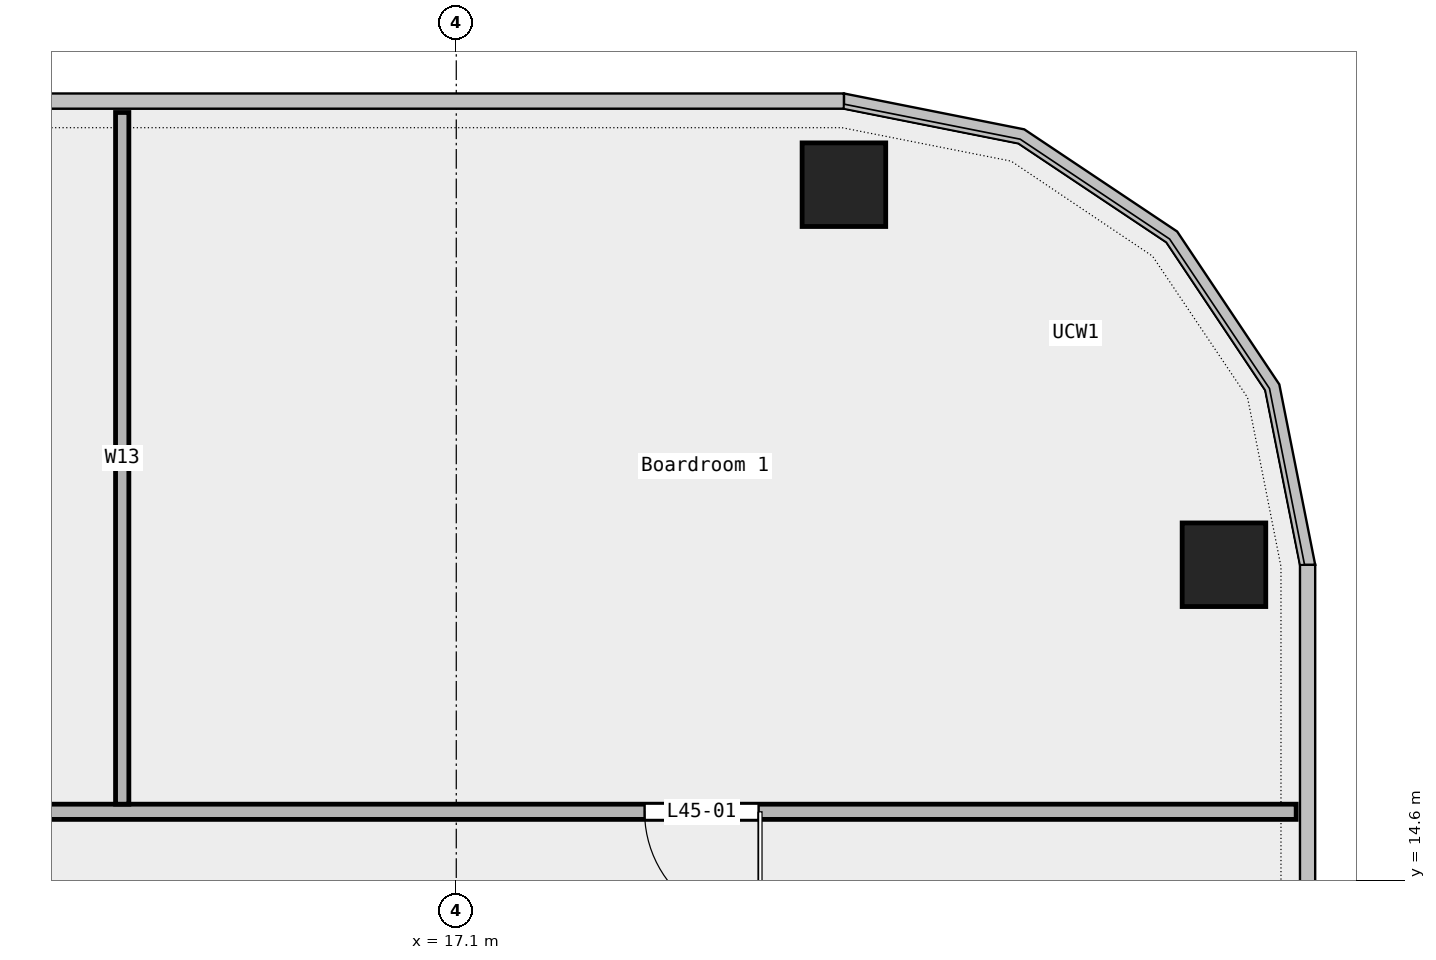
"""IFC4 building model, lengths in metres.
Left out: names, types, materials, properties, quantities, classifications, styles, units other than length and angle.
Written with IfcOpenShell. Run it as: python <this file> out.ifc"""

import sys

from ifc_helpers import new_model, si_unit, direction, frame, frame_2d, origin, origin_2d, place, context, subcontext, project, spatial, rectangle, extrude, element, fill, save


model = new_model("IFC4")
c1 = context("Model", 3, precision=1e-05, world=origin(), true_north=direction((0.0, 1.0)))
c2 = subcontext(c1, "Body", "Model", "MODEL_VIEW")
j1 = project(units=[si_unit("LENGTHUNIT", "METRE"), si_unit("PLANEANGLEUNIT", "RADIAN")], contexts=[c1])
p1 = place(None, origin())
s1 = spatial("IfcSite", under=j1, at=p1, CompositionType="ELEMENT")
p2 = place(p1, origin())
s2 = spatial("IfcBuilding", under=s1, at=p2, CompositionType="ELEMENT")
p3 = place(p2, frame((0.0, 0.0, 215.0)))
s3 = spatial("IfcBuildingStorey", under=s2, at=p3, CompositionType="ELEMENT", Elevation=215.0)
for number, where, z_axis, x_axis in (
    (1, (27.2, 18.75, 0.0), (0.0, 0.0, 1.0), (1.0, 0.0, 0.0)),
    (2, (22.2, 23.75, 0.0), (0.0, 0.0, 1.0), (1.0, 0.0, 0.0)),
):
    element("IfcColumn", number, at=place(p3, frame(where, z_axis=z_axis, x_axis=x_axis)), inside=s3, PredefinedType="COLUMN", context=c2, shape_type="SweptSolid", body=[
        extrude(rectangle(XDim=1.1, YDim=1.1, at=origin_2d()), origin(), (0.0, 0.0, 1.0), 3.6),
    ])
p4 = place(p3, frame((-17.76, 15.5, 0.0), z_axis=(0.0, 0.0, 1.0), x_axis=(1.0, 0.0, 0.0)))
e3 = element("IfcWall", 3, at=p4, inside=s3, PredefinedType="PARTITIONING", context=c2, shape_type="SweptSolid", body=[
    extrude(rectangle(XDim=45.91, YDim=0.2, at=frame_2d((22.955, 0.0))), origin(), (0.0, 0.0, 1.0), 3.6),
])
p5 = place(p4, frame((37.337, 0.0, 0.0)))
e4 = element("IfcOpeningElement", 4, at=p5, cuts=e3, PredefinedType="OPENING", context=c2, shape_type="SweptSolid", body=[
    extrude(rectangle(XDim=1.5, YDim=2.1, at=frame_2d((0.75, 1.05))), frame((0.0, 0.112, 0.0), z_axis=(0.0, -1.0, 0.0), x_axis=(1.0, 0.0, 0.0)), (0.0, 0.0, 1.0), 0.224),
])
p6 = place(p4, frame((24.633, 0.0, 0.0)))
e5 = element("IfcOpeningElement", 5, at=p6, cuts=e3, PredefinedType="OPENING", context=c2, shape_type="SweptSolid", body=[
    extrude(rectangle(XDim=1.5, YDim=2.1, at=frame_2d((0.75, 1.05))), frame((0.0, 0.112, 0.0), z_axis=(0.0, -1.0, 0.0), x_axis=(1.0, 0.0, 0.0)), (0.0, 0.0, 1.0), 0.224),
])
p7 = place(p4, frame((5.91, 0.0, 0.0)))
e6 = element("IfcOpeningElement", 6, at=p7, cuts=e3, PredefinedType="OPENING", context=c2, shape_type="SweptSolid", body=[
    extrude(rectangle(XDim=1.5, YDim=2.1, at=frame_2d((0.75, 1.05))), frame((0.0, 0.112, 0.0), z_axis=(0.0, -1.0, 0.0), x_axis=(1.0, 0.0, 0.0)), (0.0, 0.0, 1.0), 0.224),
])
p8 = place(p4, frame((16.21, 0.0, 0.0)))
e7 = element("IfcOpeningElement", 7, at=p8, cuts=e3, PredefinedType="OPENING", context=c2, shape_type="SweptSolid", body=[
    extrude(rectangle(XDim=1.2, YDim=2.1, at=frame_2d((0.6, 1.05))), frame((0.0, 0.112, 0.0), z_axis=(0.0, -1.0, 0.0), x_axis=(1.0, 0.0, 0.0)), (0.0, 0.0, 1.0), 0.224),
])
p9 = place(p3, frame((12.705, 15.6, 0.0), z_axis=(0.0, 0.0, 1.0), x_axis=(0.0, 1.0, 0.0)))
e8 = element("IfcWall", 8, at=p9, inside=s3, PredefinedType="PARTITIONING", context=c2, shape_type="SweptSolid", body=[
    extrude(rectangle(XDim=9.1, YDim=0.175, at=frame_2d((4.55, 0.0))), origin(), (0.0, 0.0, 1.0), 3.6),
])
p10 = place(p5, origin())
e9 = element("IfcDoor", 9, at=p10, inside=s3, OperationType="DOUBLE_DOOR_SINGLE_SWING", PredefinedType="DOOR", context=c2, shape_type="SweptSolid", body=[
    extrude(rectangle(XDim=1.5, YDim=2.1, at=frame_2d((0.75, 1.05))), frame((0.0, 0.025, 0.0), z_axis=(0.0, -1.0, 0.0), x_axis=(1.0, 0.0, 0.0)), (0.0, 0.0, 1.0), 0.05),
])
fill(e4, e9)
save(model, sys.argv[1])
